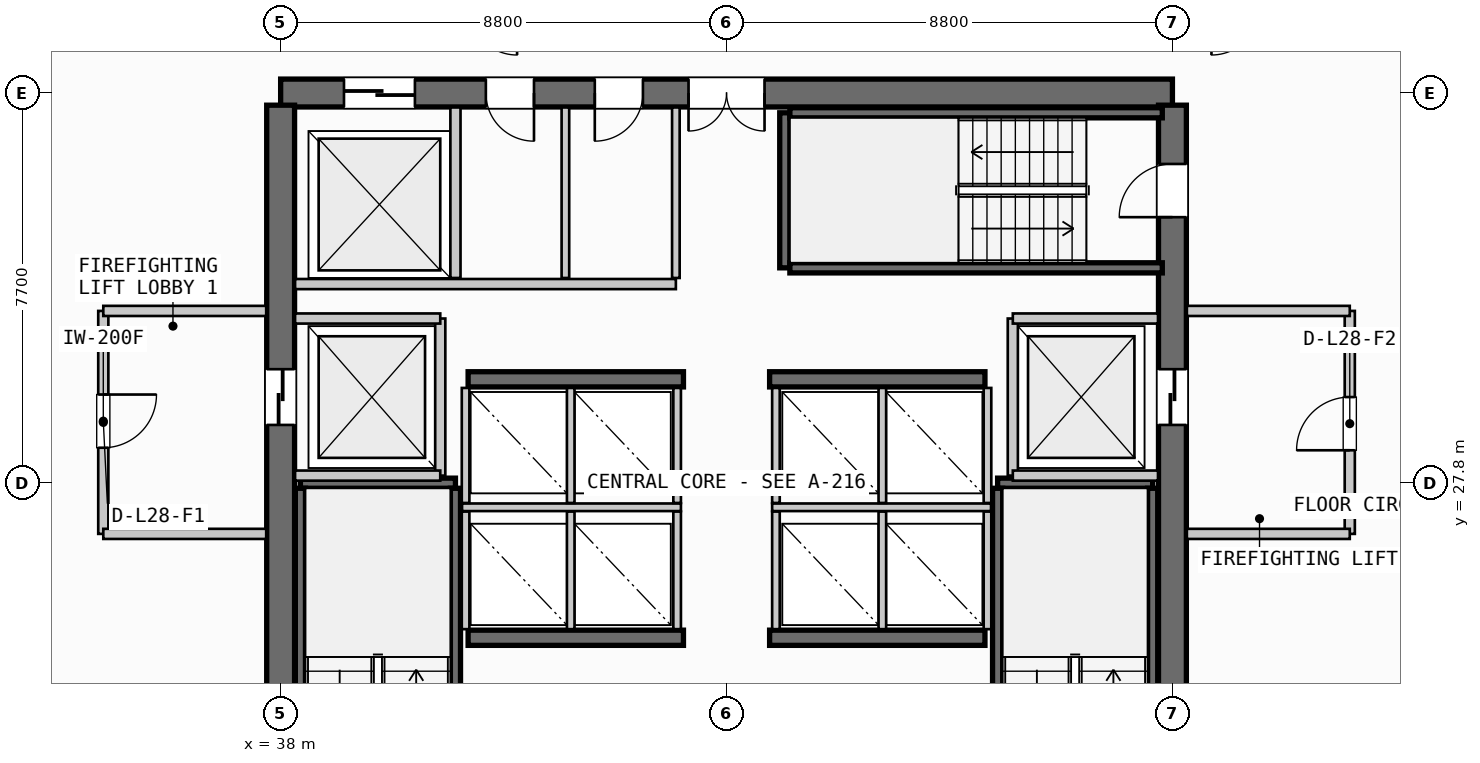
"""IFC4 building model, lengths in metres.
Left out: names, types, materials, properties, quantities, classifications, styles, units other than length and angle.
Written with IfcOpenShell. Run it as: python <this file> out.ifc"""

import sys

from ifc_helpers import new_model, si_unit, direction, frame, frame_2d, origin, place, context, subcontext, project, spatial, rectangle, extrude, source, transform, mapped, element, fill, save


model = new_model("IFC4")
c1 = context("Model", 3, precision=1e-05, world=origin(), true_north=direction((0.0, 1.0)))
c2 = subcontext(c1, "Body", "Model", "MODEL_VIEW")
j1 = project(units=[si_unit("LENGTHUNIT", "METRE"), si_unit("PLANEANGLEUNIT", "RADIAN")], contexts=[c1])
p1 = place(None, origin())
s1 = spatial("IfcSite", under=j1, at=p1, CompositionType="ELEMENT")
p2 = place(p1, origin())
s2 = spatial("IfcBuilding", under=s1, at=p2, CompositionType="ELEMENT")
p3 = place(p2, frame((0.0, 0.0, 114.4)))
s3 = spatial("IfcBuildingStorey", under=s2, at=p3, CompositionType="ELEMENT", Elevation=114.4)
p4 = place(p3, frame((55.6, 35.5, 0.0), z_axis=(0.0, 0.0, 1.0), x_axis=(-1.0, 0.0, 0.0)))
e1 = element("IfcWall", 1, at=p4, inside=s3, PredefinedType="SHEAR", context=c2, shape_type="SweptSolid", body=[
    extrude(rectangle(XDim=17.6, YDim=0.55, at=frame_2d((8.8, 0.0))), origin(), (0.0, 0.0, 1.0), 3.35),
])
p5 = place(p4, frame((8.05, 0.0, 0.0)))
e2 = element("IfcOpeningElement", 2, at=p5, cuts=e1, PredefinedType="OPENING", context=c2, shape_type="SweptSolid", body=[
    extrude(rectangle(XDim=1.5, YDim=2.2, at=frame_2d((0.75, 1.1))), frame((0.0, 0.285, 0.0), z_axis=(0.0, -1.0, 0.0), x_axis=(1.0, 0.0, 0.0)), (0.0, 0.0, 1.0), 0.57),
])
p6 = place(p4, frame((14.95, 0.0, 0.0)))
e3 = element("IfcOpeningElement", 3, at=p6, cuts=e1, PredefinedType="OPENING", context=c2, shape_type="SweptSolid", body=[
    extrude(rectangle(XDim=1.4, YDim=2.3, at=frame_2d((0.7, 1.15))), frame((0.0, 0.285, 0.0), z_axis=(0.0, -1.0, 0.0), x_axis=(1.0, 0.0, 0.0)), (0.0, 0.0, 1.0), 0.57),
])
p7 = place(p4, frame((12.6, 0.0, 0.0)))
e4 = element("IfcOpeningElement", 4, at=p7, cuts=e1, PredefinedType="OPENING", context=c2, shape_type="SweptSolid", body=[
    extrude(rectangle(XDim=0.95, YDim=2.15, at=frame_2d((0.475, 1.075))), frame((0.0, 0.285, 0.0), z_axis=(0.0, -1.0, 0.0), x_axis=(1.0, 0.0, 0.0)), (0.0, 0.0, 1.0), 0.57),
])
p8 = place(p4, frame((10.45, 0.0, 0.0)))
e5 = element("IfcOpeningElement", 5, at=p8, cuts=e1, PredefinedType="OPENING", context=c2, shape_type="SweptSolid", body=[
    extrude(rectangle(XDim=0.95, YDim=2.15, at=frame_2d((0.475, 1.075))), frame((0.0, 0.285, 0.0), z_axis=(0.0, -1.0, 0.0), x_axis=(1.0, 0.0, 0.0)), (0.0, 0.0, 1.0), 0.57),
])
p9 = place(p3, frame((38.0, 35.26, 0.0), z_axis=(0.0, 0.0, 1.0), x_axis=(0.0, -1.0, 0.0)))
e6 = element("IfcWall", 6, at=p9, inside=s3, PredefinedType="SHEAR", context=c2, shape_type="SweptSolid", body=[
    extrude(rectangle(XDim=14.92, YDim=0.55, at=frame_2d((7.46, 0.0))), origin(), (0.0, 0.0, 1.0), 3.35),
])
p10 = place(p9, frame((5.21, 0.0, 0.0)))
e7 = element("IfcOpeningElement", 7, at=p10, cuts=e6, PredefinedType="OPENING", context=c2, shape_type="SweptSolid", body=[
    extrude(rectangle(XDim=1.1, YDim=2.2, at=frame_2d((0.55, 1.1))), frame((0.0, 0.285, 0.0), z_axis=(0.0, -1.0, 0.0), x_axis=(1.0, 0.0, 0.0)), (0.0, 0.0, 1.0), 0.57),
])
p11 = place(p3, frame((55.6, 20.34, 0.0), z_axis=(0.0, 0.0, 1.0), x_axis=(0.0, 1.0, 0.0)))
e8 = element("IfcWall", 8, at=p11, inside=s3, PredefinedType="SHEAR", context=c2, shape_type="SweptSolid", body=[
    extrude(rectangle(XDim=14.92, YDim=0.55, at=frame_2d((7.46, 0.0))), origin(), (0.0, 0.0, 1.0), 3.35),
])
p12 = place(p11, frame((12.71, 0.0, 0.0)))
e9 = element("IfcOpeningElement", 9, at=p12, cuts=e8, PredefinedType="OPENING", context=c2, shape_type="SweptSolid", body=[
    extrude(rectangle(XDim=1.05, YDim=2.15, at=frame_2d((0.525, 1.075))), frame((0.0, 0.285, 0.0), z_axis=(0.0, -1.0, 0.0), x_axis=(1.0, 0.0, 0.0)), (0.0, 0.0, 1.0), 0.57),
])
p13 = place(p11, frame((8.61, 0.0, 0.0)))
e10 = element("IfcOpeningElement", 10, at=p13, cuts=e8, PredefinedType="OPENING", context=c2, shape_type="SweptSolid", body=[
    extrude(rectangle(XDim=1.1, YDim=2.2, at=frame_2d((0.55, 1.1))), frame((0.0, 0.285, 0.0), z_axis=(0.0, -1.0, 0.0), x_axis=(1.0, 0.0, 0.0)), (0.0, 0.0, 1.0), 0.57),
])
for number, where, z_axis, x_axis in (
    (11, (41.7, 24.75, 0.0), (0.0, 0.0, 1.0), (1.0, 0.0, 0.0)),
    (12, (47.65, 24.75, 0.0), (0.0, 0.0, 1.0), (1.0, 0.0, 0.0)),
    (13, (41.7, 29.85, 0.0), (0.0, 0.0, 1.0), (1.0, 0.0, 0.0)),
    (14, (47.65, 29.85, 0.0), (0.0, 0.0, 1.0), (1.0, 0.0, 0.0)),
):
    element("IfcWall", number, at=place(p3, frame(where, z_axis=z_axis, x_axis=x_axis)), inside=s3, PredefinedType="SHEAR", context=c2, shape_type="SweptSolid", body=[
        extrude(rectangle(XDim=4.25, YDim=0.3, at=frame_2d((2.125, 0.0))), origin(), (0.0, 0.0, 1.0), 3.35),
    ])
p14 = place(p3, frame((38.39, 27.8, 0.0), z_axis=(0.0, 0.0, 1.0), x_axis=(1.0, 0.0, 0.0)))
e15 = element("IfcWall", 15, at=p14, inside=s3, PredefinedType="SHEAR", context=c2, shape_type="SweptSolid", body=[
    extrude(rectangle(XDim=3.06, YDim=0.2, at=frame_2d((1.53, 0.0))), origin(), (0.0, 0.0, 1.0), 3.35),
])
for number, where, z_axis, x_axis in (
    (16, (41.45, 27.7, 0.0), (0.0, 0.0, 1.0), (0.0, -1.0, 0.0)),
    (17, (38.39, 20.35, 0.0), (0.0, 0.0, 1.0), (0.0, 1.0, 0.0)),
):
    element("IfcWall", number, at=place(p3, frame(where, z_axis=z_axis, x_axis=x_axis)), inside=s3, PredefinedType="SHEAR", context=c2, shape_type="SweptSolid", body=[
        extrude(rectangle(XDim=7.35, YDim=0.2, at=frame_2d((3.675, 0.0))), origin(), (0.0, 0.0, 1.0), 3.35),
    ])
p15 = place(p3, frame((52.15, 27.8, 0.0), z_axis=(0.0, 0.0, 1.0), x_axis=(1.0, 0.0, 0.0)))
e18 = element("IfcWall", 18, at=p15, inside=s3, PredefinedType="SHEAR", context=c2, shape_type="SweptSolid", body=[
    extrude(rectangle(XDim=3.06, YDim=0.2, at=frame_2d((1.53, 0.0))), origin(), (0.0, 0.0, 1.0), 3.35),
])
for number, where, z_axis, x_axis in (
    (19, (55.21, 27.7, 0.0), (0.0, 0.0, 1.0), (0.0, -1.0, 0.0)),
    (20, (52.15, 20.35, 0.0), (0.0, 0.0, 1.0), (0.0, 1.0, 0.0)),
):
    element("IfcWall", number, at=place(p3, frame(where, z_axis=z_axis, x_axis=x_axis)), inside=s3, PredefinedType="SHEAR", context=c2, shape_type="SweptSolid", body=[
        extrude(rectangle(XDim=7.35, YDim=0.2, at=frame_2d((3.675, 0.0))), origin(), (0.0, 0.0, 1.0), 3.35),
    ])
p16 = place(p3, frame((47.95, 32.05, 0.0), z_axis=(0.0, 0.0, 1.0), x_axis=(0.0, 1.0, 0.0)))
e21 = element("IfcWall", 21, at=p16, inside=s3, PredefinedType="SHEAR", context=c2, shape_type="SweptSolid", body=[
    extrude(rectangle(XDim=3.06, YDim=0.2, at=frame_2d((1.53, 0.0))), origin(), (0.0, 0.0, 1.0), 3.35),
])
for number, where, z_axis, x_axis in (
    (22, (48.05, 35.11, 0.0), (0.0, 0.0, 1.0), (1.0, 0.0, 0.0)),
    (23, (55.4, 32.05, 0.0), (0.0, 0.0, 1.0), (-1.0, 0.0, 0.0)),
):
    element("IfcWall", number, at=place(p3, frame(where, z_axis=z_axis, x_axis=x_axis)), inside=s3, PredefinedType="SHEAR", context=c2, shape_type="SweptSolid", body=[
        extrude(rectangle(XDim=7.35, YDim=0.2, at=frame_2d((3.675, 0.0))), origin(), (0.0, 0.0, 1.0), 3.35),
    ])
p17 = place(p3, frame((41.15, 27.95, 0.0), z_axis=(0.0, 0.0, 1.0), x_axis=(0.0, 1.0, 0.0)))
e24 = element("IfcWall", 24, at=p17, inside=s3, PredefinedType="PARTITIONING", context=c2, shape_type="SweptSolid", body=[
    extrude(rectangle(XDim=3.1, YDim=0.2, at=frame_2d((1.55, 0.0))), origin(), (0.0, 0.0, 1.0), 2.28),
])
for number, where, z_axis, x_axis in (
    (25, (38.285, 27.95, 0.0), (0.0, 0.0, 1.0), (1.0, 0.0, 0.0)),
    (26, (38.285, 31.05, 0.0), (0.0, 0.0, 1.0), (1.0, 0.0, 0.0)),
):
    element("IfcWall", number, at=place(p3, frame(where, z_axis=z_axis, x_axis=x_axis)), inside=s3, PredefinedType="PARTITIONING", context=c2, shape_type="SweptSolid", body=[
        extrude(rectangle(XDim=2.865, YDim=0.2, at=frame_2d((1.433, 0.0))), origin(), (0.0, 0.0, 1.0), 2.28),
    ])
p18 = place(p3, frame((34.5, 31.2, 0.0), z_axis=(0.0, 0.0, 1.0), x_axis=(0.0, -1.0, 0.0)))
e27 = element("IfcWall", 27, at=p18, inside=s3, PredefinedType="PARTITIONING", context=c2, shape_type="SweptSolid", body=[
    extrude(rectangle(XDim=4.4, YDim=0.2, at=frame_2d((2.2, 0.0))), origin(), (0.0, 0.0, 1.0), 2.28),
])
p19 = place(p18, frame((1.65, 0.0, 0.0)))
e28 = element("IfcOpeningElement", 28, at=p19, cuts=e27, PredefinedType="OPENING", context=c2, shape_type="SweptSolid", body=[
    extrude(rectangle(XDim=1.05, YDim=2.15, at=frame_2d((0.525, 1.075))), frame((0.0, 0.11, 0.0), z_axis=(0.0, -1.0, 0.0), x_axis=(1.0, 0.0, 0.0)), (0.0, 0.0, 1.0), 0.22),
])
for number, where, z_axis, x_axis in (
    (29, (34.5, 26.8, 0.0), (0.0, 0.0, 1.0), (1.0, 0.0, 0.0)),
    (30, (34.5, 31.2, 0.0), (0.0, 0.0, 1.0), (1.0, 0.0, 0.0)),
):
    element("IfcWall", number, at=place(p3, frame(where, z_axis=z_axis, x_axis=x_axis)), inside=s3, PredefinedType="PARTITIONING", context=c2, shape_type="SweptSolid", body=[
        extrude(rectangle(XDim=3.215, YDim=0.2, at=frame_2d((1.607, 0.0))), origin(), (0.0, 0.0, 1.0), 2.28),
    ])
p20 = place(p3, frame((52.45, 27.95, 0.0), z_axis=(0.0, 0.0, 1.0), x_axis=(0.0, 1.0, 0.0)))
e31 = element("IfcWall", 31, at=p20, inside=s3, PredefinedType="PARTITIONING", context=c2, shape_type="SweptSolid", body=[
    extrude(rectangle(XDim=3.1, YDim=0.2, at=frame_2d((1.55, 0.0))), origin(), (0.0, 0.0, 1.0), 2.28),
])
for number, where, z_axis, x_axis in (
    (32, (52.45, 27.95, 0.0), (0.0, 0.0, 1.0), (1.0, 0.0, 0.0)),
    (33, (52.45, 31.05, 0.0), (0.0, 0.0, 1.0), (1.0, 0.0, 0.0)),
):
    element("IfcWall", number, at=place(p3, frame(where, z_axis=z_axis, x_axis=x_axis)), inside=s3, PredefinedType="PARTITIONING", context=c2, shape_type="SweptSolid", body=[
        extrude(rectangle(XDim=2.865, YDim=0.2, at=frame_2d((1.433, 0.0))), origin(), (0.0, 0.0, 1.0), 2.28),
    ])
p21 = place(p3, frame((59.1, 26.8, 0.0), z_axis=(0.0, 0.0, 1.0), x_axis=(0.0, 1.0, 0.0)))
e34 = element("IfcWall", 34, at=p21, inside=s3, PredefinedType="PARTITIONING", context=c2, shape_type="SweptSolid", body=[
    extrude(rectangle(XDim=4.4, YDim=0.2, at=frame_2d((2.2, 0.0))), origin(), (0.0, 0.0, 1.0), 2.28),
])
p22 = place(p21, frame((1.65, 0.0, 0.0)))
e35 = element("IfcOpeningElement", 35, at=p22, cuts=e34, PredefinedType="OPENING", context=c2, shape_type="SweptSolid", body=[
    extrude(rectangle(XDim=1.05, YDim=2.15, at=frame_2d((0.525, 1.075))), frame((0.0, 0.11, 0.0), z_axis=(0.0, -1.0, 0.0), x_axis=(1.0, 0.0, 0.0)), (0.0, 0.0, 1.0), 0.22),
])
for number, where, z_axis, x_axis in (
    (36, (55.885, 26.8, 0.0), (0.0, 0.0, 1.0), (1.0, 0.0, 0.0)),
    (37, (55.885, 31.2, 0.0), (0.0, 0.0, 1.0), (1.0, 0.0, 0.0)),
):
    element("IfcWall", number, at=place(p3, frame(where, z_axis=z_axis, x_axis=x_axis)), inside=s3, PredefinedType="PARTITIONING", context=c2, shape_type="SweptSolid", body=[
        extrude(rectangle(XDim=3.215, YDim=0.2, at=frame_2d((1.607, 0.0))), origin(), (0.0, 0.0, 1.0), 2.28),
    ])
p23 = place(p3, frame((41.58, 27.325, 0.0), z_axis=(0.0, 0.0, 1.0), x_axis=(1.0, 0.0, 0.0)))
e38 = element("IfcWall", 38, at=p23, inside=s3, PredefinedType="PARTITIONING", context=c2, shape_type="SweptSolid", body=[
    extrude(rectangle(XDim=4.32, YDim=0.15, at=frame_2d((2.16, 0.0))), origin(), (0.0, 0.0, 1.0), 2.28),
])
p24 = place(p3, frame((47.7, 27.325, 0.0), z_axis=(0.0, 0.0, 1.0), x_axis=(1.0, 0.0, 0.0)))
e39 = element("IfcWall", 39, at=p24, inside=s3, PredefinedType="PARTITIONING", context=c2, shape_type="SweptSolid", body=[
    extrude(rectangle(XDim=4.32, YDim=0.15, at=frame_2d((2.16, 0.0))), origin(), (0.0, 0.0, 1.0), 2.28),
])
for number, where, z_axis, x_axis in (
    (40, (41.65, 24.92, 0.0), (0.0, 0.0, 1.0), (0.0, 1.0, 0.0)),
    (41, (43.725, 24.92, 0.0), (0.0, 0.0, 1.0), (0.0, 1.0, 0.0)),
    (42, (45.825, 24.92, 0.0), (0.0, 0.0, 1.0), (0.0, 1.0, 0.0)),
    (43, (47.775, 24.92, 0.0), (0.0, 0.0, 1.0), (0.0, 1.0, 0.0)),
    (44, (49.875, 24.92, 0.0), (0.0, 0.0, 1.0), (0.0, 1.0, 0.0)),
    (45, (51.95, 24.92, 0.0), (0.0, 0.0, 1.0), (0.0, 1.0, 0.0)),
):
    element("IfcWall", number, at=place(p3, frame(where, z_axis=z_axis, x_axis=x_axis)), inside=s3, PredefinedType="PARTITIONING", context=c2, shape_type="SweptSolid", body=[
        extrude(rectangle(XDim=2.32, YDim=0.15, at=frame_2d((1.16, 0.0))), origin(), (0.0, 0.0, 1.0), 2.28),
    ])
for number, where, z_axis, x_axis in (
    (46, (41.65, 27.41, 0.0), (0.0, 0.0, 1.0), (0.0, 1.0, 0.0)),
    (47, (43.725, 27.41, 0.0), (0.0, 0.0, 1.0), (0.0, 1.0, 0.0)),
    (48, (45.825, 27.41, 0.0), (0.0, 0.0, 1.0), (0.0, 1.0, 0.0)),
    (49, (47.775, 27.41, 0.0), (0.0, 0.0, 1.0), (0.0, 1.0, 0.0)),
    (50, (49.875, 27.41, 0.0), (0.0, 0.0, 1.0), (0.0, 1.0, 0.0)),
    (51, (51.95, 27.41, 0.0), (0.0, 0.0, 1.0), (0.0, 1.0, 0.0)),
):
    element("IfcWall", number, at=place(p3, frame(where, z_axis=z_axis, x_axis=x_axis)), inside=s3, PredefinedType="PARTITIONING", context=c2, shape_type="SweptSolid", body=[
        extrude(rectangle(XDim=2.27, YDim=0.15, at=frame_2d((1.135, 0.0))), origin(), (0.0, 0.0, 1.0), 2.28),
    ])
p25 = place(p3, frame((41.45, 31.85, 0.0), z_axis=(0.0, 0.0, 1.0), x_axis=(0.0, 1.0, 0.0)))
e52 = element("IfcWall", 52, at=p25, inside=s3, PredefinedType="PARTITIONING", context=c2, shape_type="SweptSolid", body=[
    extrude(rectangle(XDim=3.365, YDim=0.2, at=frame_2d((1.683, 0.0))), origin(), (0.0, 0.0, 1.0), 2.28),
])
p26 = place(p3, frame((38.285, 31.73, 0.0), z_axis=(0.0, 0.0, 1.0), x_axis=(1.0, 0.0, 0.0)))
e53 = element("IfcWall", 53, at=p26, inside=s3, PredefinedType="PARTITIONING", context=c2, shape_type="SweptSolid", body=[
    extrude(rectangle(XDim=7.515, YDim=0.2, at=frame_2d((3.758, 0.0))), origin(), (0.0, 0.0, 1.0), 2.28),
])
p27 = place(p3, frame((45.8, 31.85, 0.0), z_axis=(0.0, 0.0, 1.0), x_axis=(0.0, 1.0, 0.0)))
e54 = element("IfcWall", 54, at=p27, inside=s3, PredefinedType="PARTITIONING", context=c2, shape_type="SweptSolid", body=[
    extrude(rectangle(XDim=3.365, YDim=0.15, at=frame_2d((1.683, 0.0))), origin(), (0.0, 0.0, 1.0), 2.28),
])
p28 = place(p3, frame((43.62, 31.85, 0.0), z_axis=(0.0, 0.0, 1.0), x_axis=(0.0, 1.0, 0.0)))
e55 = element("IfcWall", 55, at=p28, inside=s3, PredefinedType="PLUMBINGWALL", context=c2, shape_type="SweptSolid", body=[
    extrude(rectangle(XDim=3.365, YDim=0.15, at=frame_2d((1.683, 0.0))), origin(), (0.0, 0.0, 1.0), 2.28),
])
m1 = source(origin(), c2, "Body", "SweptSolid", [
    extrude(rectangle(XDim=1.05, YDim=2.15, at=frame_2d((0.525, 1.075))), frame((0.0, 0.025, 0.0), z_axis=(0.0, -1.0, 0.0), x_axis=(1.0, 0.0, 0.0)), (0.0, 0.0, 1.0), 0.05),
])
p29 = place(p12, origin())
e56 = element("IfcDoor", 56, at=p29, inside=s3, OperationType="SINGLE_SWING_LEFT", PredefinedType="DOOR", context=c2, shape_type="MappedRepresentation", body=[
    mapped(m1, transform((0.0, 0.0, 0.0), scale=1.0)),
])
fill(e9, e56)
m2 = source(origin(), c2, "Body", "SweptSolid", [
    extrude(rectangle(XDim=1.5, YDim=2.2, at=frame_2d((0.75, 1.1))), frame((0.0, 0.025, 0.0), z_axis=(0.0, -1.0, 0.0), x_axis=(1.0, 0.0, 0.0)), (0.0, 0.0, 1.0), 0.05),
])
p30 = place(p5, origin())
e57 = element("IfcDoor", 57, at=p30, inside=s3, OperationType="DOUBLE_DOOR_SINGLE_SWING", PredefinedType="DOOR", context=c2, shape_type="MappedRepresentation", body=[
    mapped(m2, transform((0.0, 0.0, 0.0), scale=1.0)),
])
fill(e2, e57)
m3 = source(origin(), c2, "Body", "SweptSolid", [
    extrude(rectangle(XDim=1.1, YDim=2.2, at=frame_2d((0.55, 1.1))), frame((0.0, 0.025, 0.0), z_axis=(0.0, -1.0, 0.0), x_axis=(1.0, 0.0, 0.0)), (0.0, 0.0, 1.0), 0.05),
])
p31 = place(p10, origin())
e58 = element("IfcDoor", 58, at=p31, inside=s3, OperationType="SLIDING_TO_LEFT", PredefinedType="DOOR", context=c2, shape_type="MappedRepresentation", body=[
    mapped(m3, transform((0.0, 0.0, 0.0), scale=1.0)),
])
fill(e7, e58)
p32 = place(p13, origin())
e59 = element("IfcDoor", 59, at=p32, inside=s3, OperationType="SLIDING_TO_RIGHT", PredefinedType="DOOR", context=c2, shape_type="MappedRepresentation", body=[
    mapped(m3, transform((0.0, 0.0, 0.0), scale=1.0)),
])
fill(e10, e59)
m4 = source(origin(), c2, "Body", "SweptSolid", [
    extrude(rectangle(XDim=1.4, YDim=2.3, at=frame_2d((0.7, 1.15))), frame((0.0, 0.025, 0.0), z_axis=(0.0, -1.0, 0.0), x_axis=(1.0, 0.0, 0.0)), (0.0, 0.0, 1.0), 0.05),
])
p33 = place(p6, origin())
e60 = element("IfcDoor", 60, at=p33, inside=s3, OperationType="SLIDING_TO_RIGHT", PredefinedType="DOOR", context=c2, shape_type="MappedRepresentation", body=[
    mapped(m4, transform((0.0, 0.0, 0.0), scale=1.0)),
])
fill(e3, e60)
m5 = source(origin(), c2, "Body", "SweptSolid", [
    extrude(rectangle(XDim=0.95, YDim=2.15, at=frame_2d((0.475, 1.075))), frame((0.0, 0.025, 0.0), z_axis=(0.0, -1.0, 0.0), x_axis=(1.0, 0.0, 0.0)), (0.0, 0.0, 1.0), 0.05),
])
p34 = place(p7, origin())
e61 = element("IfcDoor", 61, at=p34, inside=s3, OperationType="SINGLE_SWING_LEFT", PredefinedType="DOOR", context=c2, shape_type="MappedRepresentation", body=[
    mapped(m5, transform((0.0, 0.0, 0.0), scale=1.0)),
])
fill(e4, e61)
p35 = place(p8, origin())
e62 = element("IfcDoor", 62, at=p35, inside=s3, OperationType="SINGLE_SWING_RIGHT", PredefinedType="DOOR", context=c2, shape_type="MappedRepresentation", body=[
    mapped(m5, transform((0.0, 0.0, 0.0), scale=1.0)),
])
fill(e5, e62)
p36 = place(p19, origin())
e63 = element("IfcDoor", 63, at=p36, inside=s3, OperationType="SINGLE_SWING_LEFT", PredefinedType="DOOR", context=c2, shape_type="MappedRepresentation", body=[
    mapped(m1, transform((0.0, 0.0, 0.0), scale=1.0)),
])
fill(e28, e63)
p37 = place(p22, origin())
e64 = element("IfcDoor", 64, at=p37, inside=s3, OperationType="SINGLE_SWING_LEFT", PredefinedType="DOOR", context=c2, shape_type="MappedRepresentation", body=[
    mapped(m1, transform((0.0, 0.0, 0.0), scale=1.0)),
])
fill(e35, e64)
save(model, sys.argv[1])
